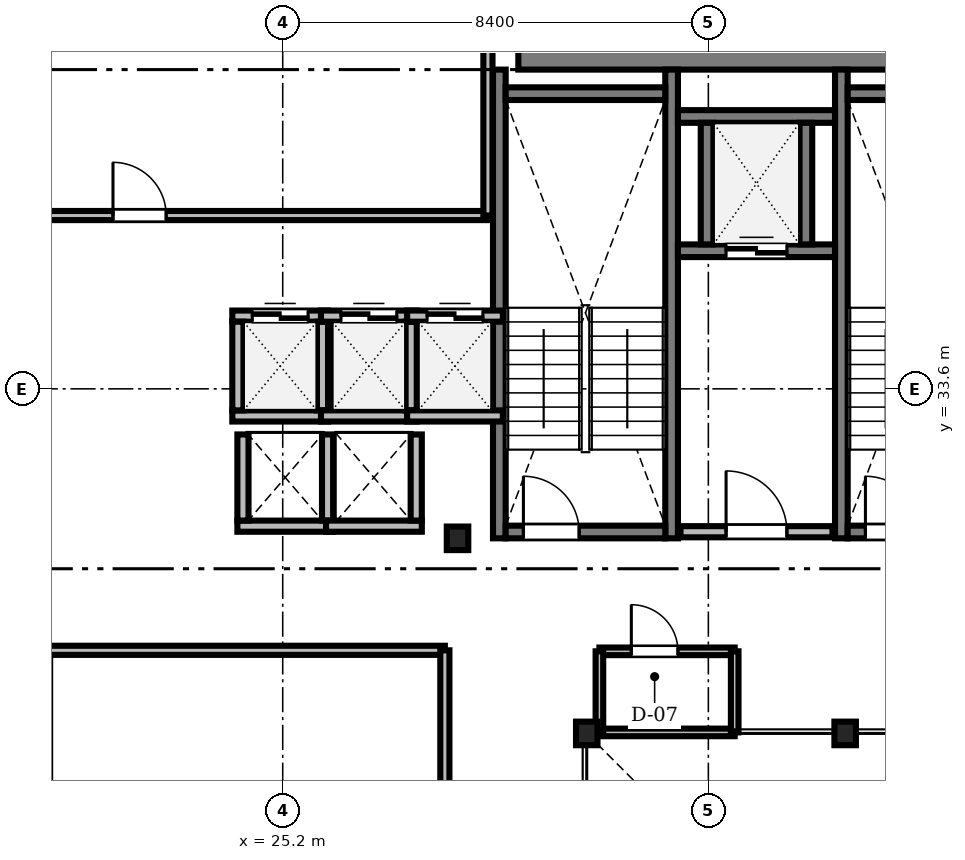
"""IFC4 building model, lengths in metres.
Left out: names, types, materials, properties, quantities, classifications, styles, units other than length and angle.
Written with IfcOpenShell. Run it as: python <this file> out.ifc"""

import sys

from ifc_helpers import new_model, si_unit, direction, frame, frame_2d, origin, origin_2d, place, context, subcontext, project, spatial, rectangle, i_section, extrude, source, transform, mapped, element, fill, save


model = new_model("IFC4")
c1 = context("Model", 3, precision=1e-05, world=origin(), true_north=direction((0.0, 1.0)))
c2 = subcontext(c1, "Body", "Model", "MODEL_VIEW")
j1 = project(units=[si_unit("LENGTHUNIT", "METRE"), si_unit("PLANEANGLEUNIT", "RADIAN")], contexts=[c1])
p1 = place(None, origin())
s1 = spatial("IfcSite", under=j1, at=p1, CompositionType="ELEMENT")
p2 = place(p1, origin())
s2 = spatial("IfcBuilding", under=s1, at=p2, CompositionType="ELEMENT")
p3 = place(p2, frame((0.0, 0.0, 133.5)))
s3 = spatial("IfcBuildingStorey", under=s2, at=p3, CompositionType="ELEMENT", Elevation=133.5)
m1 = source(origin(), c2, "Body", "SweptSolid", [
    extrude(rectangle(XDim=17.52, YDim=0.8, at=frame_2d((8.76, 0.0))), origin(), (0.0, 0.0, 1.0), 3.46),
])
p4 = place(p3, frame((29.85, 40.3, 0.0), z_axis=(0.0, 0.0, 1.0), x_axis=(1.0, 0.0, 0.0)))
e1 = element("IfcWall", 1, at=p4, inside=s3, PredefinedType="SHEAR", context=c2, shape_type="MappedRepresentation", body=[
    mapped(m1, transform((0.0, 0.0, 0.0), scale=1.0)),
])
m2 = source(origin(), c2, "Body", "SweptSolid", [
    extrude(i_section(OverallWidth=0.424, OverallDepth=0.465, WebThickness=0.035, FlangeThickness=0.056, FilletRadius=0.015, at=origin_2d()), origin(), (0.0, 0.0, 1.0), 3.46),
])
for number, where, z_axis, x_axis in (
    (2, (36.3, 26.8, 0.0), (0.0, 0.0, 1.0), (1.0, 0.0, 0.0)),
    (3, (31.2, 26.8, 0.0), (0.0, 0.0, 1.0), (1.0, 0.0, 0.0)),
    (4, (28.65, 30.65, 0.0), (0.0, 0.0, 1.0), (1.0, 0.0, 0.0)),
):
    element("IfcColumn", number, at=place(p3, frame(where, z_axis=z_axis, x_axis=x_axis)), inside=s3, PredefinedType="COLUMN", context=c2, shape_type="MappedRepresentation", body=[
        mapped(m2, transform((0.0, 0.0, 0.0), scale=1.0)),
    ])
m3 = source(origin(), c2, "Body", "SweptSolid", [
    extrude(rectangle(XDim=9.25, YDim=0.25, at=frame_2d((4.625, 0.0))), origin(), (0.0, 0.0, 1.0), 3.5),
])
for number, where, z_axis, x_axis in (
    (5, (29.475, 30.65, 0.0), (0.0, 0.0, 1.0), (0.0, 1.0, 0.0)),
    (6, (32.875, 30.65, 0.0), (0.0, 0.0, 1.0), (0.0, 1.0, 0.0)),
):
    element("IfcWall", number, at=place(p3, frame(where, z_axis=z_axis, x_axis=x_axis)), inside=s3, PredefinedType="SOLIDWALL", context=c2, shape_type="MappedRepresentation", body=[
        mapped(m3, transform((0.0, 0.0, 0.0), scale=1.0)),
    ])
m4 = source(origin(), c2, "Body", "SweptSolid", [
    extrude(rectangle(XDim=3.15, YDim=0.25, at=frame_2d((1.575, 0.0))), origin(), (0.0, 0.0, 1.0), 3.5),
])
p5 = place(p3, frame((29.6, 39.425, 0.0), z_axis=(0.0, 0.0, 1.0), x_axis=(1.0, 0.0, 0.0)))
e7 = element("IfcWall", 7, at=p5, inside=s3, PredefinedType="SOLIDWALL", context=c2, shape_type="MappedRepresentation", body=[
    mapped(m4, transform((0.0, 0.0, 0.0), scale=1.0)),
])
p6 = place(p3, frame((29.6, 30.775, 0.0), z_axis=(0.0, 0.0, 1.0), x_axis=(1.0, 0.0, 0.0)))
e8 = element("IfcWall", 8, at=p6, inside=s3, PredefinedType="SOLIDWALL", context=c2, shape_type="MappedRepresentation", body=[
    mapped(m4, transform((0.0, 0.0, 0.0), scale=1.0)),
])
m5 = source(origin(), c2, "Body", "SweptSolid", [
    extrude(rectangle(XDim=1.1, YDim=2.2, at=frame_2d((0.55, 1.1))), frame((0.0, 0.135, 0.0), z_axis=(0.0, -1.0, 0.0), x_axis=(1.0, 0.0, 0.0)), (0.0, 0.0, 1.0), 0.27),
])
p7 = place(p6, frame((0.35, 0.0, 0.0)))
e9 = element("IfcOpeningElement", 9, at=p7, cuts=e8, PredefinedType="OPENING", context=c2, shape_type="MappedRepresentation", body=[
    mapped(m5, transform((0.0, 0.0, 0.0), scale=1.0)),
])
p8 = place(p3, frame((36.225, 30.65, 0.0), z_axis=(0.0, 0.0, 1.0), x_axis=(0.0, 1.0, 0.0)))
e10 = element("IfcWall", 10, at=p8, inside=s3, PredefinedType="SOLIDWALL", context=c2, shape_type="MappedRepresentation", body=[
    mapped(m3, transform((0.0, 0.0, 0.0), scale=1.0)),
])
p9 = place(p3, frame((36.35, 39.425, 0.0), z_axis=(0.0, 0.0, 1.0), x_axis=(1.0, 0.0, 0.0)))
e11 = element("IfcWall", 11, at=p9, inside=s3, PredefinedType="SOLIDWALL", context=c2, shape_type="MappedRepresentation", body=[
    mapped(m4, transform((0.0, 0.0, 0.0), scale=1.0)),
])
p10 = place(p3, frame((36.35, 30.775, 0.0), z_axis=(0.0, 0.0, 1.0), x_axis=(1.0, 0.0, 0.0)))
e12 = element("IfcWall", 12, at=p10, inside=s3, PredefinedType="SOLIDWALL", context=c2, shape_type="MappedRepresentation", body=[
    mapped(m4, transform((0.0, 0.0, 0.0), scale=1.0)),
])
p11 = place(p10, frame((0.35, 0.0, 0.0)))
e13 = element("IfcOpeningElement", 13, at=p11, cuts=e12, PredefinedType="OPENING", context=c2, shape_type="MappedRepresentation", body=[
    mapped(m5, transform((0.0, 0.0, 0.0), scale=1.0)),
])
m6 = source(origin(), c2, "Body", "SweptSolid", [
    extrude(rectangle(XDim=3.0, YDim=0.22, at=frame_2d((1.5, 0.0))), origin(), (0.0, 0.0, 1.0), 3.46),
])
p12 = place(p3, frame((33.05, 30.78, 0.0), z_axis=(0.0, 0.0, 1.0), x_axis=(1.0, 0.0, 0.0)))
e14 = element("IfcWall", 14, at=p12, inside=s3, PredefinedType="SOLIDWALL", context=c2, shape_type="MappedRepresentation", body=[
    mapped(m6, transform((0.0, 0.0, 0.0), scale=1.0)),
])
m7 = source(origin(), c2, "Body", "SweptSolid", [
    extrude(rectangle(XDim=1.2, YDim=2.2, at=frame_2d((0.6, 1.1))), frame((0.0, 0.12, 0.0), z_axis=(0.0, -1.0, 0.0), x_axis=(1.0, 0.0, 0.0)), (0.0, 0.0, 1.0), 0.24),
])
p13 = place(p12, frame((0.9, 0.0, 0.0)))
e15 = element("IfcOpeningElement", 15, at=p13, cuts=e14, PredefinedType="OPENING", context=c2, shape_type="MappedRepresentation", body=[
    mapped(m7, transform((0.0, 0.0, 0.0), scale=1.0)),
])
m8 = source(origin(), c2, "Body", "SweptSolid", [
    extrude(rectangle(XDim=1.89, YDim=0.22, at=frame_2d((0.945, 0.0))), origin(), (0.0, 0.0, 1.0), 3.46),
])
p14 = place(p3, frame((24.205, 33.065, 0.0), z_axis=(0.0, 0.0, 1.0), x_axis=(1.0, 0.0, 0.0)))
e16 = element("IfcWall", 16, at=p14, inside=s3, PredefinedType="SOLIDWALL", context=c2, shape_type="MappedRepresentation", body=[
    mapped(m8, transform((0.0, 0.0, 0.0), scale=1.0)),
])
p15 = place(p3, frame((24.205, 35.035, 0.0), z_axis=(0.0, 0.0, 1.0), x_axis=(1.0, 0.0, 0.0)))
e17 = element("IfcWall", 17, at=p15, inside=s3, PredefinedType="SOLIDWALL", context=c2, shape_type="MappedRepresentation", body=[
    mapped(m8, transform((0.0, 0.0, 0.0), scale=1.0)),
])
m9 = source(origin(), c2, "Body", "SweptSolid", [
    extrude(rectangle(XDim=1.1, YDim=2.2, at=frame_2d((0.55, 1.1))), frame((0.0, 0.12, 0.0), z_axis=(0.0, -1.0, 0.0), x_axis=(1.0, 0.0, 0.0)), (0.0, 0.0, 1.0), 0.24),
])
p16 = place(p15, frame((0.395, 0.0, 0.0)))
e18 = element("IfcOpeningElement", 18, at=p16, cuts=e17, PredefinedType="OPENING", context=c2, shape_type="MappedRepresentation", body=[
    mapped(m9, transform((0.0, 0.0, 0.0), scale=1.0)),
])
m10 = source(origin(), c2, "Body", "SweptSolid", [
    extrude(rectangle(XDim=1.75, YDim=0.22, at=frame_2d((0.875, 0.0))), origin(), (0.0, 0.0, 1.0), 3.46),
])
for number, where, z_axis, x_axis in (
    (19, (24.315, 33.175, 0.0), (0.0, 0.0, 1.0), (0.0, 1.0, 0.0)),
    (20, (25.985, 33.175, 0.0), (0.0, 0.0, 1.0), (0.0, 1.0, 0.0)),
):
    element("IfcWall", number, at=place(p3, frame(where, z_axis=z_axis, x_axis=x_axis)), inside=s3, PredefinedType="SOLIDWALL", context=c2, shape_type="MappedRepresentation", body=[
        mapped(m10, transform((0.0, 0.0, 0.0), scale=1.0)),
    ])
p17 = place(p3, frame((25.955, 33.065, 0.0), z_axis=(0.0, 0.0, 1.0), x_axis=(1.0, 0.0, 0.0)))
e21 = element("IfcWall", 21, at=p17, inside=s3, PredefinedType="SOLIDWALL", context=c2, shape_type="MappedRepresentation", body=[
    mapped(m8, transform((0.0, 0.0, 0.0), scale=1.0)),
])
p18 = place(p3, frame((25.955, 35.035, 0.0), z_axis=(0.0, 0.0, 1.0), x_axis=(1.0, 0.0, 0.0)))
e22 = element("IfcWall", 22, at=p18, inside=s3, PredefinedType="SOLIDWALL", context=c2, shape_type="MappedRepresentation", body=[
    mapped(m8, transform((0.0, 0.0, 0.0), scale=1.0)),
])
p19 = place(p18, frame((0.395, 0.0, 0.0)))
e23 = element("IfcOpeningElement", 23, at=p19, cuts=e22, PredefinedType="OPENING", context=c2, shape_type="MappedRepresentation", body=[
    mapped(m9, transform((0.0, 0.0, 0.0), scale=1.0)),
])
p20 = place(p3, frame((27.735, 33.175, 0.0), z_axis=(0.0, 0.0, 1.0), x_axis=(0.0, 1.0, 0.0)))
e24 = element("IfcWall", 24, at=p20, inside=s3, PredefinedType="SOLIDWALL", context=c2, shape_type="MappedRepresentation", body=[
    mapped(m10, transform((0.0, 0.0, 0.0), scale=1.0)),
])
p21 = place(p3, frame((27.655, 33.065, 0.0), z_axis=(0.0, 0.0, 1.0), x_axis=(1.0, 0.0, 0.0)))
e25 = element("IfcWall", 25, at=p21, inside=s3, PredefinedType="SOLIDWALL", context=c2, shape_type="MappedRepresentation", body=[
    mapped(m8, transform((0.0, 0.0, 0.0), scale=1.0)),
])
p22 = place(p3, frame((27.655, 35.035, 0.0), z_axis=(0.0, 0.0, 1.0), x_axis=(1.0, 0.0, 0.0)))
e26 = element("IfcWall", 26, at=p22, inside=s3, PredefinedType="SOLIDWALL", context=c2, shape_type="MappedRepresentation", body=[
    mapped(m8, transform((0.0, 0.0, 0.0), scale=1.0)),
])
p23 = place(p22, frame((0.395, 0.0, 0.0)))
e27 = element("IfcOpeningElement", 27, at=p23, cuts=e26, PredefinedType="OPENING", context=c2, shape_type="MappedRepresentation", body=[
    mapped(m9, transform((0.0, 0.0, 0.0), scale=1.0)),
])
m11 = source(origin(), c2, "Body", "SweptSolid", [
    extrude(rectangle(XDim=3.1, YDim=0.25, at=frame_2d((1.55, 0.0))), origin(), (0.0, 0.0, 1.0), 3.46),
])
p24 = place(p3, frame((33.0, 36.325, 0.0), z_axis=(0.0, 0.0, 1.0), x_axis=(1.0, 0.0, 0.0)))
e28 = element("IfcWall", 28, at=p24, inside=s3, PredefinedType="SOLIDWALL", context=c2, shape_type="MappedRepresentation", body=[
    mapped(m11, transform((0.0, 0.0, 0.0), scale=1.0)),
])
m12 = source(origin(), c2, "Body", "SweptSolid", [
    extrude(rectangle(XDim=1.2, YDim=2.25, at=frame_2d((0.6, 1.125))), frame((0.0, 0.135, 0.0), z_axis=(0.0, -1.0, 0.0), x_axis=(1.0, 0.0, 0.0)), (0.0, 0.0, 1.0), 0.27),
])
p25 = place(p24, frame((0.95, 0.0, 0.0)))
e29 = element("IfcOpeningElement", 29, at=p25, cuts=e28, PredefinedType="OPENING", context=c2, shape_type="MappedRepresentation", body=[
    mapped(m12, transform((0.0, 0.0, 0.0), scale=1.0)),
])
p26 = place(p3, frame((33.0, 38.975, 0.0), z_axis=(0.0, 0.0, 1.0), x_axis=(1.0, 0.0, 0.0)))
e30 = element("IfcWall", 30, at=p26, inside=s3, PredefinedType="SOLIDWALL", context=c2, shape_type="MappedRepresentation", body=[
    mapped(m11, transform((0.0, 0.0, 0.0), scale=1.0)),
])
m13 = source(origin(), c2, "Body", "SweptSolid", [
    extrude(rectangle(XDim=2.4, YDim=0.25, at=frame_2d((1.2, 0.0))), origin(), (0.0, 0.0, 1.0), 3.46),
])
for number, where, z_axis, x_axis in (
    (31, (33.575, 36.45, 0.0), (0.0, 0.0, 1.0), (0.0, 1.0, 0.0)),
    (32, (35.525, 36.45, 0.0), (0.0, 0.0, 1.0), (0.0, 1.0, 0.0)),
):
    element("IfcWall", number, at=place(p3, frame(where, z_axis=z_axis, x_axis=x_axis)), inside=s3, PredefinedType="SOLIDWALL", context=c2, shape_type="MappedRepresentation", body=[
        mapped(m13, transform((0.0, 0.0, 0.0), scale=1.0)),
    ])
m14 = source(origin(), c2, "Body", "SweptSolid", [
    extrude(rectangle(XDim=1.89, YDim=0.22, at=frame_2d((0.945, 0.0))), origin(), (0.0, 0.0, 1.0), 3.46),
])
p27 = place(p3, frame((24.305, 30.89, 0.0), z_axis=(0.0, 0.0, 1.0), x_axis=(1.0, 0.0, 0.0)))
e33 = element("IfcWall", 33, at=p27, inside=s3, PredefinedType="SOLIDWALL", context=c2, shape_type="MappedRepresentation", body=[
    mapped(m14, transform((0.0, 0.0, 0.0), scale=1.0)),
])
m15 = source(origin(), c2, "Body", "SweptSolid", [
    extrude(rectangle(XDim=1.7, YDim=0.22, at=frame_2d((0.85, 0.0))), origin(), (0.0, 0.0, 1.0), 3.46),
])
for number, where, z_axis, x_axis in (
    (34, (24.415, 31.0, 0.0), (0.0, 0.0, 1.0), (0.0, 1.0, 0.0)),
    (35, (26.085, 31.0, 0.0), (0.0, 0.0, 1.0), (0.0, 1.0, 0.0)),
):
    element("IfcWall", number, at=place(p3, frame(where, z_axis=z_axis, x_axis=x_axis)), inside=s3, PredefinedType="SOLIDWALL", context=c2, shape_type="MappedRepresentation", body=[
        mapped(m15, transform((0.0, 0.0, 0.0), scale=1.0)),
    ])
p28 = place(p3, frame((26.055, 30.89, 0.0), z_axis=(0.0, 0.0, 1.0), x_axis=(1.0, 0.0, 0.0)))
e36 = element("IfcWall", 36, at=p28, inside=s3, PredefinedType="SOLIDWALL", context=c2, shape_type="MappedRepresentation", body=[
    mapped(m14, transform((0.0, 0.0, 0.0), scale=1.0)),
])
p29 = place(p3, frame((27.835, 31.0, 0.0), z_axis=(0.0, 0.0, 1.0), x_axis=(0.0, 1.0, 0.0)))
e37 = element("IfcWall", 37, at=p29, inside=s3, PredefinedType="SOLIDWALL", context=c2, shape_type="MappedRepresentation", body=[
    mapped(m15, transform((0.0, 0.0, 0.0), scale=1.0)),
])
m16 = source(origin(), c2, "Body", "SweptSolid", [
    extrude(rectangle(XDim=22.328, YDim=0.18, at=frame_2d((11.164, 0.0))), origin(), (0.0, 0.0, 1.0), 2.702),
])
p30 = place(p3, frame((6.922, 37.02, 0.0), z_axis=(0.0, 0.0, 1.0), x_axis=(1.0, 0.0, 0.0)))
e38 = element("IfcWall", 38, at=p30, inside=s3, PredefinedType="PARTITIONING", context=c2, shape_type="MappedRepresentation", body=[
    mapped(m16, transform((0.0, 0.0, 0.0), scale=1.0)),
])
m17 = source(origin(), c2, "Body", "SweptSolid", [
    extrude(rectangle(XDim=1.05, YDim=2.2, at=frame_2d((0.525, 1.1))), frame((0.0, 0.1, 0.0), z_axis=(0.0, -1.0, 0.0), x_axis=(1.0, 0.0, 0.0)), (0.0, 0.0, 1.0), 0.2),
])
p31 = place(p30, frame((14.928, 0.0, 0.0)))
e39 = element("IfcOpeningElement", 39, at=p31, cuts=e38, PredefinedType="OPENING", context=c2, shape_type="MappedRepresentation", body=[
    mapped(m17, transform((0.0, 0.0, 0.0), scale=1.0)),
])
m18 = source(origin(), c2, "Body", "SweptSolid", [
    extrude(rectangle(XDim=2.67, YDim=0.15, at=frame_2d((1.335, 0.0))), origin(), (0.0, 0.0, 1.0), 3.092),
])
p32 = place(p3, frame((31.45, 28.42, 0.0), z_axis=(0.0, 0.0, 1.0), x_axis=(1.0, 0.0, 0.0)))
e40 = element("IfcWall", 40, at=p32, inside=s3, PredefinedType="PARTITIONING", context=c2, shape_type="MappedRepresentation", body=[
    mapped(m18, transform((0.0, 0.0, 0.0), scale=1.0)),
])
m19 = source(origin(), c2, "Body", "SweptSolid", [
    extrude(rectangle(XDim=0.92, YDim=2.1, at=frame_2d((0.46, 1.05))), frame((0.0, 0.085, 0.0), z_axis=(0.0, -1.0, 0.0), x_axis=(1.0, 0.0, 0.0)), (0.0, 0.0, 1.0), 0.17),
])
p33 = place(p32, frame((0.63, 0.0, 0.0)))
e41 = element("IfcOpeningElement", 41, at=p33, cuts=e40, PredefinedType="OPENING", context=c2, shape_type="MappedRepresentation", body=[
    mapped(m19, transform((0.0, 0.0, 0.0), scale=1.0)),
])
m20 = source(origin(), c2, "Body", "SweptSolid", [
    extrude(rectangle(XDim=11.45, YDim=0.18, at=frame_2d((5.725, 0.0))), origin(), (0.0, 0.0, 1.0), 2.702),
])
p34 = place(p3, frame((29.25, 37.02, 0.0), z_axis=(0.0, 0.0, 1.0), x_axis=(0.0, 1.0, 0.0)))
e42 = element("IfcWall", 42, at=p34, inside=s3, PredefinedType="PARTITIONING", context=c2, shape_type="MappedRepresentation", body=[
    mapped(m20, transform((0.0, 0.0, 0.0), scale=1.0)),
])
m21 = source(origin(), c2, "Body", "SweptSolid", [
    extrude(rectangle(XDim=7.88, YDim=0.18, at=frame_2d((3.94, 0.0))), origin(), (0.0, 0.0, 1.0), 3.46),
])
p35 = place(p3, frame((20.52, 28.44, 0.0), z_axis=(0.0, 0.0, 1.0), x_axis=(1.0, 0.0, 0.0)))
e43 = element("IfcWall", 43, at=p35, inside=s3, PredefinedType="PARTITIONING", context=c2, shape_type="MappedRepresentation", body=[
    mapped(m21, transform((0.0, 0.0, 0.0), scale=1.0)),
])
m22 = source(origin(), c2, "Body", "SweptSolid", [
    extrude(rectangle(XDim=6.54, YDim=0.18, at=frame_2d((3.27, 0.0))), origin(), (0.0, 0.0, 1.0), 2.852),
])
p36 = place(p3, frame((28.4, 21.9, 0.0), z_axis=(0.0, 0.0, 1.0), x_axis=(0.0, 1.0, 0.0)))
e44 = element("IfcWall", 44, at=p36, inside=s3, PredefinedType="PARTITIONING", context=c2, shape_type="MappedRepresentation", body=[
    mapped(m22, transform((0.0, 0.0, 0.0), scale=1.0)),
])
m23 = source(origin(), c2, "Body", "SweptSolid", [
    extrude(rectangle(XDim=2.67, YDim=0.15, at=frame_2d((1.335, 0.0))), origin(), (0.0, 0.0, 1.0), 3.002),
])
p37 = place(p3, frame((31.45, 26.82, 0.0), z_axis=(0.0, 0.0, 1.0), x_axis=(1.0, 0.0, 0.0)))
e45 = element("IfcWall", 45, at=p37, inside=s3, PredefinedType="PARTITIONING", context=c2, shape_type="MappedRepresentation", body=[
    mapped(m23, transform((0.0, 0.0, 0.0), scale=1.0)),
])
m24 = source(origin(), c2, "Body", "SweptSolid", [
    extrude(rectangle(XDim=1.6, YDim=0.15, at=frame_2d((0.8, 0.0))), origin(), (0.0, 0.0, 1.0), 3.002),
])
for number, where, z_axis, x_axis in (
    (46, (31.45, 26.82, 0.0), (0.0, 0.0, 1.0), (0.0, 1.0, 0.0)),
    (47, (34.12, 26.82, 0.0), (0.0, 0.0, 1.0), (0.0, 1.0, 0.0)),
):
    element("IfcWall", number, at=place(p3, frame(where, z_axis=z_axis, x_axis=x_axis)), inside=s3, PredefinedType="PARTITIONING", context=c2, shape_type="MappedRepresentation", body=[
        mapped(m24, transform((0.0, 0.0, 0.0), scale=1.0)),
    ])
m25 = source(origin(), c2, "Body", "SweptSolid", [
    extrude(rectangle(XDim=1.1, YDim=2.2, at=frame_2d((0.55, 1.1))), frame((0.0, 0.025, 0.0), z_axis=(0.0, -1.0, 0.0), x_axis=(1.0, 0.0, 0.0)), (0.0, 0.0, 1.0), 0.05),
])
p38 = place(p7, origin())
e48 = element("IfcDoor", 48, at=p38, inside=s3, OperationType="SINGLE_SWING_LEFT", PredefinedType="DOOR", context=c2, shape_type="MappedRepresentation", body=[
    mapped(m25, transform((0.0, 0.0, 0.0), scale=1.0)),
])
fill(e9, e48)
p39 = place(p11, origin())
e49 = element("IfcDoor", 49, at=p39, inside=s3, OperationType="SINGLE_SWING_LEFT", PredefinedType="DOOR", context=c2, shape_type="MappedRepresentation", body=[
    mapped(m25, transform((0.0, 0.0, 0.0), scale=1.0)),
])
fill(e13, e49)
m26 = source(origin(), c2, "Body", "SweptSolid", [
    extrude(rectangle(XDim=1.2, YDim=2.2, at=frame_2d((0.6, 1.1))), frame((0.0, 0.025, 0.0), z_axis=(0.0, -1.0, 0.0), x_axis=(1.0, 0.0, 0.0)), (0.0, 0.0, 1.0), 0.05),
])
p40 = place(p13, origin())
e50 = element("IfcDoor", 50, at=p40, inside=s3, OperationType="SINGLE_SWING_LEFT", PredefinedType="DOOR", context=c2, shape_type="MappedRepresentation", body=[
    mapped(m26, transform((0.0, 0.0, 0.0), scale=1.0)),
])
fill(e15, e50)
p41 = place(p16, origin())
e51 = element("IfcDoor", 51, at=p41, inside=s3, OperationType="DOUBLE_DOOR_SLIDING", PredefinedType="DOOR", context=c2, shape_type="MappedRepresentation", body=[
    mapped(m25, transform((0.0, 0.0, 0.0), scale=1.0)),
])
fill(e18, e51)
p42 = place(p19, origin())
e52 = element("IfcDoor", 52, at=p42, inside=s3, OperationType="DOUBLE_DOOR_SLIDING", PredefinedType="DOOR", context=c2, shape_type="MappedRepresentation", body=[
    mapped(m25, transform((0.0, 0.0, 0.0), scale=1.0)),
])
fill(e23, e52)
p43 = place(p23, origin())
e53 = element("IfcDoor", 53, at=p43, inside=s3, OperationType="DOUBLE_DOOR_SLIDING", PredefinedType="DOOR", context=c2, shape_type="MappedRepresentation", body=[
    mapped(m25, transform((0.0, 0.0, 0.0), scale=1.0)),
])
fill(e27, e53)
m27 = source(origin(), c2, "Body", "SweptSolid", [
    extrude(rectangle(XDim=1.2, YDim=2.25, at=frame_2d((0.6, 1.125))), frame((0.0, 0.025, 0.0), z_axis=(0.0, -1.0, 0.0), x_axis=(1.0, 0.0, 0.0)), (0.0, 0.0, 1.0), 0.05),
])
p44 = place(p25, origin())
e54 = element("IfcDoor", 54, at=p44, inside=s3, OperationType="DOUBLE_DOOR_SLIDING", PredefinedType="DOOR", context=c2, shape_type="MappedRepresentation", body=[
    mapped(m27, transform((0.0, 0.0, 0.0), scale=1.0)),
])
fill(e29, e54)
m28 = source(origin(), c2, "Body", "SweptSolid", [
    extrude(rectangle(XDim=1.05, YDim=2.2, at=frame_2d((0.525, 1.1))), frame((0.0, 0.025, 0.0), z_axis=(0.0, -1.0, 0.0), x_axis=(1.0, 0.0, 0.0)), (0.0, 0.0, 1.0), 0.05),
])
p45 = place(p31, origin())
e55 = element("IfcDoor", 55, at=p45, inside=s3, OperationType="SINGLE_SWING_LEFT", PredefinedType="DOOR", context=c2, shape_type="MappedRepresentation", body=[
    mapped(m28, transform((0.0, 0.0, 0.0), scale=1.0)),
])
fill(e39, e55)
m29 = source(origin(), c2, "Body", "SweptSolid", [
    extrude(rectangle(XDim=0.92, YDim=2.1, at=frame_2d((0.46, 1.05))), frame((0.0, 0.025, 0.0), z_axis=(0.0, -1.0, 0.0), x_axis=(1.0, 0.0, 0.0)), (0.0, 0.0, 1.0), 0.05),
])
p46 = place(p33, origin())
e56 = element("IfcDoor", 56, at=p46, inside=s3, OperationType="SINGLE_SWING_LEFT", PredefinedType="DOOR", context=c2, shape_type="MappedRepresentation", body=[
    mapped(m29, transform((0.0, 0.0, 0.0), scale=1.0)),
])
fill(e41, e56)
save(model, sys.argv[1])
